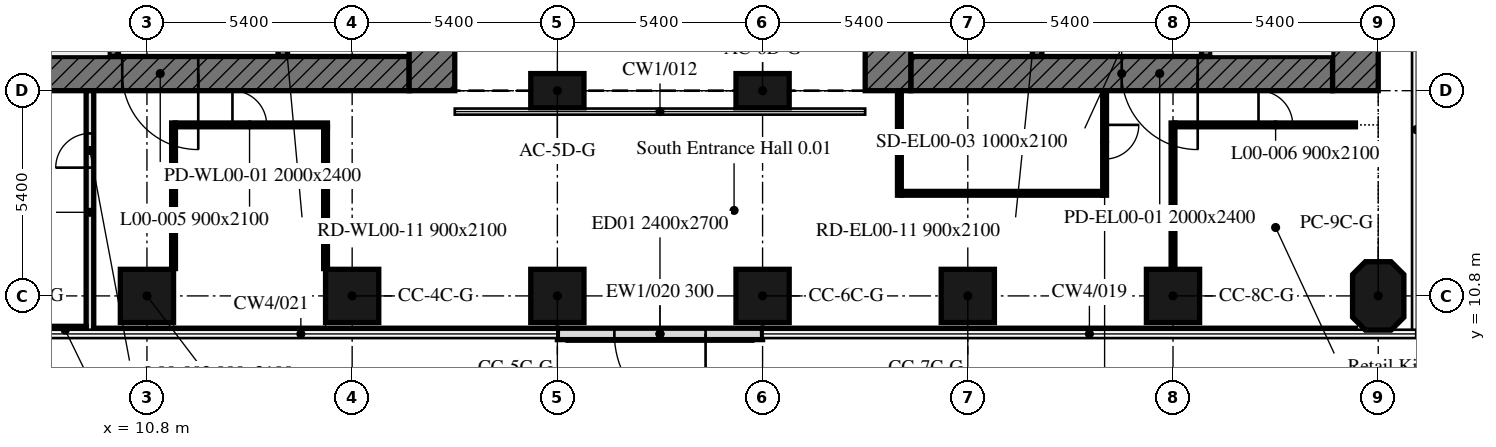
"""IFC4 building model, lengths in metres.
Left out: names, types, materials, properties, quantities, classifications, styles, units other than length and angle.
Written with IfcOpenShell. Run it as: python <this file> out.ifc"""

import sys

from ifc_helpers import new_model, si_unit, direction, frame, frame_2d, origin, origin_2d, place, context, subcontext, project, spatial, polyline, rectangle, outline, extrude, element, fill, save


model = new_model("IFC4")
c1 = context("Model", 3, precision=1e-05, world=origin(), true_north=direction((0.0, 1.0)))
c2 = subcontext(c1, "Body", "Model", "MODEL_VIEW")
j1 = project(units=[si_unit("LENGTHUNIT", "METRE"), si_unit("PLANEANGLEUNIT", "RADIAN")], contexts=[c1])
p1 = place(None, origin())
s1 = spatial("IfcSite", under=j1, at=p1, CompositionType="ELEMENT")
p2 = place(p1, origin())
s2 = spatial("IfcBuilding", under=s1, at=p2, CompositionType="ELEMENT")
p3 = place(p2, origin())
s3 = spatial("IfcBuildingStorey", under=s2, at=p3, CompositionType="ELEMENT", Elevation=0.0)
for number, where, z_axis, x_axis in (
    (1, (10.8, 10.8, 0.0), (0.0, 0.0, 1.0), (1.0, 0.0, 0.0)),
    (2, (16.2, 10.8, 0.0), (0.0, 0.0, 1.0), (1.0, 0.0, 0.0)),
    (3, (21.6, 10.8, 0.0), (0.0, 0.0, 1.0), (1.0, 0.0, 0.0)),
    (4, (27.0, 10.8, 0.0), (0.0, 0.0, 1.0), (1.0, 0.0, 0.0)),
    (5, (32.4, 10.8, 0.0), (0.0, 0.0, 1.0), (1.0, 0.0, 0.0)),
    (6, (37.8, 10.8, 0.0), (0.0, 0.0, 1.0), (1.0, 0.0, 0.0)),
):
    element("IfcColumn", number, at=place(p3, frame(where, z_axis=z_axis, x_axis=x_axis)), inside=s3, PredefinedType="COLUMN", context=c2, shape_type="SweptSolid", body=[
        extrude(rectangle(XDim=1.4, YDim=1.4, at=origin_2d()), origin(), (0.0, 0.0, 1.0), 8.0),
    ])
p4 = place(p3, frame((43.2, 10.8, 0.0), z_axis=(0.0, 0.0, 1.0), x_axis=(0.0, 1.0, 0.0)))
e7 = element("IfcColumn", 7, at=p4, inside=s3, PredefinedType="COLUMN", context=c2, shape_type="SweptSolid", body=[
    extrude(outline(polyline([(-0.562, -0.675), (0.562, -0.675), (0.9, -0.337), (0.9, 0.337), (0.562, 0.675), (-0.562, 0.675), (-0.9, 0.337), (-0.9, -0.337), (-0.562, -0.675)])), origin(), (0.0, 0.0, 1.0), 8.0),
])
for number, where, z_axis, x_axis in (
    (8, (21.6, 16.2, 0.0), (0.0, 0.0, 1.0), (1.0, 0.0, 0.0)),
    (9, (27.0, 16.2, 0.0), (0.0, 0.0, 1.0), (1.0, 0.0, 0.0)),
):
    element("IfcColumn", number, at=place(p3, frame(where, z_axis=z_axis, x_axis=x_axis)), inside=s3, PredefinedType="COLUMN", context=c2, shape_type="SweptSolid", body=[
        extrude(rectangle(XDim=1.4, YDim=0.9, at=origin_2d()), origin(), (0.0, 0.0, 1.0), 8.0),
    ])
p5 = place(p3, frame((27.0, 9.8, 0.0), z_axis=(0.0, 0.0, 1.0), x_axis=(-1.0, 0.0, 0.0)))
e10 = element("IfcWall", 10, at=p5, inside=s3, PredefinedType="SOLIDWALL", context=c2, shape_type="SweptSolid", body=[
    extrude(rectangle(XDim=5.4, YDim=0.3, at=frame_2d((2.7, 0.0))), origin(), (0.0, 0.0, 1.0), 8.0),
])
p6 = place(p5, frame((1.5, 0.0, 0.0)))
e11 = element("IfcOpeningElement", 11, at=p6, cuts=e10, PredefinedType="OPENING", context=c2, shape_type="SweptSolid", body=[
    extrude(rectangle(XDim=2.4, YDim=2.7, at=frame_2d((1.2, 1.35))), frame((0.0, 0.16, 0.0), z_axis=(0.0, -1.0, 0.0), x_axis=(1.0, 0.0, 0.0)), (0.0, 0.0, 1.0), 0.32),
])
p7 = place(p3, frame((17.7, 16.65, 0.0), z_axis=(0.0, 0.0, 1.0), x_axis=(-1.0, 0.0, 0.0)))
e12 = element("IfcWall", 12, at=p7, inside=s3, PredefinedType="SOLIDWALL", context=c2, shape_type="SweptSolid", body=[
    extrude(rectangle(XDim=11.1, YDim=0.9, at=frame_2d((5.55, 0.0))), origin(), (0.0, 0.0, 1.0), 8.0),
])
p8 = place(p7, frame((5.55, 0.0, 0.0)))
e13 = element("IfcOpeningElement", 13, at=p8, cuts=e12, PredefinedType="OPENING", context=c2, shape_type="SweptSolid", body=[
    extrude(rectangle(XDim=2.0, YDim=2.4, at=frame_2d((1.0, 1.2))), frame((0.0, 0.45, 0.0), z_axis=(0.0, -1.0, 0.0), x_axis=(1.0, 0.0, 0.0)), (0.0, 0.0, 1.0), 0.9),
])
p9 = place(p3, frame((18.3, 32.4, 0.0), z_axis=(0.0, 0.0, 1.0), x_axis=(0.0, -1.0, 0.0)))
e14 = element("IfcWall", 14, at=p9, inside=s3, PredefinedType="SOLIDWALL", context=c2, shape_type="SweptSolid", body=[
    extrude(rectangle(XDim=16.2, YDim=1.2, at=frame_2d((8.1, 0.0))), origin(), (0.0, 0.0, 1.0), 8.0),
])
p10 = place(p3, frame((9.925, 17.1, 0.0), z_axis=(0.0, 0.0, 1.0), x_axis=(0.0, 1.0, 0.0)))
e15 = element("IfcWall", 15, at=p10, inside=s3, PredefinedType="SOLIDWALL", context=c2, shape_type="SweptSolid", body=[
    extrude(rectangle(XDim=14.4, YDim=0.25, at=frame_2d((7.2, 0.0))), origin(), (0.0, 0.0, 1.0), 8.0),
])
p11 = place(p10, frame((4.6, 0.0, 0.0)))
e16 = element("IfcOpeningElement", 16, at=p11, cuts=e15, PredefinedType="OPENING", context=c2, shape_type="SweptSolid", body=[
    extrude(rectangle(XDim=1.0, YDim=2.1, at=frame_2d((0.5, 1.05))), frame((0.0, 0.125, 0.0), z_axis=(0.0, -1.0, 0.0), x_axis=(1.0, 0.0, 0.0)), (0.0, 0.0, 1.0), 0.25),
])
p12 = place(p10, frame((7.062, 0.0, 0.0)))
e17 = element("IfcOpeningElement", 17, at=p12, cuts=e15, PredefinedType="OPENING", context=c2, shape_type="SweptSolid", body=[
    extrude(rectangle(XDim=1.2, YDim=2.1, at=frame_2d((0.6, 1.05))), frame((0.0, 0.125, 0.0), z_axis=(0.0, -1.0, 0.0), x_axis=(1.0, 0.0, 0.0)), (0.0, 0.0, 1.0), 0.25),
])
p13 = place(p10, frame((9.925, 0.0, 0.0)))
e18 = element("IfcOpeningElement", 18, at=p13, cuts=e15, PredefinedType="OPENING", context=c2, shape_type="SweptSolid", body=[
    extrude(rectangle(XDim=1.1, YDim=2.1, at=frame_2d((0.55, 1.05))), frame((0.0, 0.125, 0.0), z_axis=(0.0, -1.0, 0.0), x_axis=(1.0, 0.0, 0.0)), (0.0, 0.0, 1.0), 0.25),
])
p14 = place(p10, frame((12.587, 0.0, 0.0)))
e19 = element("IfcOpeningElement", 19, at=p14, cuts=e15, PredefinedType="OPENING", context=c2, shape_type="SweptSolid", body=[
    extrude(rectangle(XDim=1.1, YDim=2.1, at=frame_2d((0.55, 1.05))), frame((0.0, 0.125, 0.0), z_axis=(0.0, -1.0, 0.0), x_axis=(1.0, 0.0, 0.0)), (0.0, 0.0, 1.0), 0.25),
])
p15 = place(p3, frame((14.375, 17.1, 0.0), z_axis=(0.0, 0.0, 1.0), x_axis=(0.0, 1.0, 0.0)))
e20 = element("IfcWall", 20, at=p15, inside=s3, PredefinedType="SOLIDWALL", context=c2, shape_type="SweptSolid", body=[
    extrude(rectangle(XDim=14.4, YDim=0.25, at=frame_2d((7.2, 0.0))), origin(), (0.0, 0.0, 1.0), 8.0),
])
p16 = place(p15, frame((13.15, 0.0, 0.0)))
e21 = element("IfcOpeningElement", 21, at=p16, cuts=e20, PredefinedType="OPENING", context=c2, shape_type="SweptSolid", body=[
    extrude(rectangle(XDim=1.0, YDim=2.1, at=frame_2d((0.5, 1.05))), frame((0.0, 0.125, 0.0), z_axis=(0.0, -1.0, 0.0), x_axis=(1.0, 0.0, 0.0)), (0.0, 0.0, 1.0), 0.25),
])
p17 = place(p15, frame((6.025, 0.0, 0.0)))
e22 = element("IfcOpeningElement", 22, at=p17, cuts=e20, PredefinedType="OPENING", context=c2, shape_type="SweptSolid", body=[
    extrude(rectangle(XDim=1.2, YDim=2.1, at=frame_2d((0.6, 1.05))), frame((0.0, 0.125, 0.0), z_axis=(0.0, -1.0, 0.0), x_axis=(1.0, 0.0, 0.0)), (0.0, 0.0, 1.0), 0.25),
])
p18 = place(p15, frame((0.846, 0.0, 0.0)))
e23 = element("IfcOpeningElement", 23, at=p18, cuts=e20, PredefinedType="OPENING", context=c2, shape_type="SweptSolid", body=[
    extrude(rectangle(XDim=0.9, YDim=2.1, at=frame_2d((0.45, 1.05))), frame((0.0, 0.125, 0.0), z_axis=(0.0, -1.0, 0.0), x_axis=(1.0, 0.0, 0.0)), (0.0, 0.0, 1.0), 0.25),
])
p19 = place(p15, frame((3.346, 0.0, 0.0)))
e24 = element("IfcOpeningElement", 24, at=p19, cuts=e20, PredefinedType="OPENING", context=c2, shape_type="SweptSolid", body=[
    extrude(rectangle(XDim=0.9, YDim=2.1, at=frame_2d((0.45, 1.05))), frame((0.0, 0.125, 0.0), z_axis=(0.0, -1.0, 0.0), x_axis=(1.0, 0.0, 0.0)), (0.0, 0.0, 1.0), 0.25),
])
p20 = place(p3, frame((42.0, 16.65, 0.0), z_axis=(0.0, 0.0, 1.0), x_axis=(-1.0, 0.0, 0.0)))
e25 = element("IfcWall", 25, at=p20, inside=s3, PredefinedType="SOLIDWALL", context=c2, shape_type="SweptSolid", body=[
    extrude(rectangle(XDim=11.1, YDim=0.9, at=frame_2d((5.55, 0.0))), origin(), (0.0, 0.0, 1.0), 8.0),
])
p21 = place(p20, frame((3.55, 0.0, 0.0)))
e26 = element("IfcOpeningElement", 26, at=p21, cuts=e25, PredefinedType="OPENING", context=c2, shape_type="SweptSolid", body=[
    extrude(rectangle(XDim=2.0, YDim=2.4, at=frame_2d((1.0, 1.2))), frame((0.0, 0.45, 0.0), z_axis=(0.0, -1.0, 0.0), x_axis=(1.0, 0.0, 0.0)), (0.0, 0.0, 1.0), 0.9),
])
p22 = place(p3, frame((42.6, 32.4, 0.0), z_axis=(0.0, 0.0, 1.0), x_axis=(0.0, -1.0, 0.0)))
e27 = element("IfcWall", 27, at=p22, inside=s3, PredefinedType="SOLIDWALL", context=c2, shape_type="SweptSolid", body=[
    extrude(rectangle(XDim=16.2, YDim=1.2, at=frame_2d((8.1, 0.0))), origin(), (0.0, 0.0, 1.0), 8.0),
])
p23 = place(p22, frame((9.45, 0.0, 0.0)))
e28 = element("IfcOpeningElement", 28, at=p23, cuts=e27, PredefinedType="OPENING", context=c2, shape_type="SweptSolid", body=[
    extrude(rectangle(XDim=1.2, YDim=2.1, at=frame_2d((0.6, 1.05))), frame((0.0, 0.6, 0.0), z_axis=(0.0, -1.0, 0.0), x_axis=(1.0, 0.0, 0.0)), (0.0, 0.0, 1.0), 1.2),
])
p24 = place(p3, frame((30.3, 16.2, 0.0), z_axis=(0.0, 0.0, 1.0), x_axis=(0.0, 1.0, 0.0)))
e29 = element("IfcWall", 29, at=p24, inside=s3, PredefinedType="SOLIDWALL", context=c2, shape_type="SweptSolid", body=[
    extrude(rectangle(XDim=16.2, YDim=1.2, at=frame_2d((8.1, 0.0))), origin(), (0.0, 0.0, 1.0), 8.0),
])
p25 = place(p3, frame((38.675, 17.1, 0.0), z_axis=(0.0, 0.0, 1.0), x_axis=(0.0, 1.0, 0.0)))
e30 = element("IfcWall", 30, at=p25, inside=s3, PredefinedType="SOLIDWALL", context=c2, shape_type="SweptSolid", body=[
    extrude(rectangle(XDim=14.4, YDim=0.25, at=frame_2d((7.2, 0.0))), origin(), (0.0, 0.0, 1.0), 8.0),
])
p26 = place(p25, frame((4.6, 0.0, 0.0)))
e31 = element("IfcOpeningElement", 31, at=p26, cuts=e30, PredefinedType="OPENING", context=c2, shape_type="SweptSolid", body=[
    extrude(rectangle(XDim=1.0, YDim=2.1, at=frame_2d((0.5, 1.05))), frame((0.0, 0.125, 0.0), z_axis=(0.0, -1.0, 0.0), x_axis=(1.0, 0.0, 0.0)), (0.0, 0.0, 1.0), 0.25),
])
p27 = place(p25, frame((7.062, 0.0, 0.0)))
e32 = element("IfcOpeningElement", 32, at=p27, cuts=e30, PredefinedType="OPENING", context=c2, shape_type="SweptSolid", body=[
    extrude(rectangle(XDim=1.2, YDim=2.1, at=frame_2d((0.6, 1.05))), frame((0.0, 0.125, 0.0), z_axis=(0.0, -1.0, 0.0), x_axis=(1.0, 0.0, 0.0)), (0.0, 0.0, 1.0), 0.25),
])
p28 = place(p25, frame((9.925, 0.0, 0.0)))
e33 = element("IfcOpeningElement", 33, at=p28, cuts=e30, PredefinedType="OPENING", context=c2, shape_type="SweptSolid", body=[
    extrude(rectangle(XDim=1.1, YDim=2.1, at=frame_2d((0.55, 1.05))), frame((0.0, 0.125, 0.0), z_axis=(0.0, -1.0, 0.0), x_axis=(1.0, 0.0, 0.0)), (0.0, 0.0, 1.0), 0.25),
])
p29 = place(p25, frame((12.587, 0.0, 0.0)))
e34 = element("IfcOpeningElement", 34, at=p29, cuts=e30, PredefinedType="OPENING", context=c2, shape_type="SweptSolid", body=[
    extrude(rectangle(XDim=1.1, YDim=2.1, at=frame_2d((0.55, 1.05))), frame((0.0, 0.125, 0.0), z_axis=(0.0, -1.0, 0.0), x_axis=(1.0, 0.0, 0.0)), (0.0, 0.0, 1.0), 0.25),
])
p30 = place(p3, frame((34.225, 17.1, 0.0), z_axis=(0.0, 0.0, 1.0), x_axis=(0.0, 1.0, 0.0)))
e35 = element("IfcWall", 35, at=p30, inside=s3, PredefinedType="SOLIDWALL", context=c2, shape_type="SweptSolid", body=[
    extrude(rectangle(XDim=14.4, YDim=0.25, at=frame_2d((7.2, 0.0))), origin(), (0.0, 0.0, 1.0), 8.0),
])
p31 = place(p30, frame((13.15, 0.0, 0.0)))
e36 = element("IfcOpeningElement", 36, at=p31, cuts=e35, PredefinedType="OPENING", context=c2, shape_type="SweptSolid", body=[
    extrude(rectangle(XDim=1.0, YDim=2.1, at=frame_2d((0.5, 1.05))), frame((0.0, 0.125, 0.0), z_axis=(0.0, -1.0, 0.0), x_axis=(1.0, 0.0, 0.0)), (0.0, 0.0, 1.0), 0.25),
])
p32 = place(p30, frame((6.025, 0.0, 0.0)))
e37 = element("IfcOpeningElement", 37, at=p32, cuts=e35, PredefinedType="OPENING", context=c2, shape_type="SweptSolid", body=[
    extrude(rectangle(XDim=1.2, YDim=2.1, at=frame_2d((0.6, 1.05))), frame((0.0, 0.125, 0.0), z_axis=(0.0, -1.0, 0.0), x_axis=(1.0, 0.0, 0.0)), (0.0, 0.0, 1.0), 0.25),
])
p33 = place(p30, frame((0.846, 0.0, 0.0)))
e38 = element("IfcOpeningElement", 38, at=p33, cuts=e35, PredefinedType="OPENING", context=c2, shape_type="SweptSolid", body=[
    extrude(rectangle(XDim=0.9, YDim=2.1, at=frame_2d((0.45, 1.05))), frame((0.0, 0.125, 0.0), z_axis=(0.0, -1.0, 0.0), x_axis=(1.0, 0.0, 0.0)), (0.0, 0.0, 1.0), 0.25),
])
p34 = place(p30, frame((3.346, 0.0, 0.0)))
e39 = element("IfcOpeningElement", 39, at=p34, cuts=e35, PredefinedType="OPENING", context=c2, shape_type="SweptSolid", body=[
    extrude(rectangle(XDim=0.9, YDim=2.1, at=frame_2d((0.45, 1.05))), frame((0.0, 0.125, 0.0), z_axis=(0.0, -1.0, 0.0), x_axis=(1.0, 0.0, 0.0)), (0.0, 0.0, 1.0), 0.25),
])
p35 = place(p3, frame((9.3, 9.8, 0.0), z_axis=(0.0, 0.0, 1.0), x_axis=(0.0, 1.0, 0.0)))
e40 = element("IfcWall", 40, at=p35, inside=s3, PredefinedType="PARTITIONING", context=c2, shape_type="SweptSolid", body=[
    extrude(rectangle(XDim=6.4, YDim=0.2, at=frame_2d((3.2, 0.0))), origin(), (0.0, 0.0, 1.0), 7.25),
])
p36 = place(p35, frame((4.375, 0.0, 0.0)))
e41 = element("IfcOpeningElement", 41, at=p36, cuts=e40, PredefinedType="OPENING", context=c2, shape_type="SweptSolid", body=[
    extrude(rectangle(XDim=0.9, YDim=2.1, at=frame_2d((0.45, 1.05))), frame((0.0, 0.1, 0.0), z_axis=(0.0, -1.0, 0.0), x_axis=(1.0, 0.0, 0.0)), (0.0, 0.0, 1.0), 0.2),
])
p37 = place(p3, frame((8.1, 9.9, 0.0), z_axis=(0.0, 0.0, 1.0), x_axis=(1.0, 0.0, 0.0)))
e42 = element("IfcWall", 42, at=p37, inside=s3, PredefinedType="PARTITIONING", context=c2, shape_type="SweptSolid", body=[
    extrude(rectangle(XDim=1.1, YDim=0.2, at=frame_2d((0.55, 0.0))), origin(), (0.0, 0.0, 1.0), 8.0),
])
p38 = place(p3, frame((30.6, 13.45, 0.0), z_axis=(0.0, 0.0, 1.0), x_axis=(0.0, 1.0, 0.0)))
e43 = element("IfcWall", 43, at=p38, inside=s3, PredefinedType="PARTITIONING", context=c2, shape_type="SweptSolid", body=[
    extrude(rectangle(XDim=2.75, YDim=0.1, at=frame_2d((1.375, 0.0))), origin(), (0.0, 0.0, 1.0), 8.0),
])
p39 = place(p3, frame((11.5, 11.52, 0.0), z_axis=(0.0, 0.0, 1.0), x_axis=(0.0, 1.0, 0.0)))
e44 = element("IfcWall", 44, at=p39, inside=s3, PredefinedType="PARTITIONING", context=c2, shape_type="SweptSolid", body=[
    extrude(rectangle(XDim=3.83, YDim=0.1, at=frame_2d((1.915, 0.0))), origin(), (0.0, 0.0, 1.0), 8.0),
])
p40 = place(p3, frame((11.55, 15.3, 0.0), z_axis=(0.0, 0.0, 1.0), x_axis=(1.0, 0.0, 0.0)))
e45 = element("IfcWall", 45, at=p40, inside=s3, PredefinedType="PARTITIONING", context=c2, shape_type="SweptSolid", body=[
    extrude(rectangle(XDim=4.0, YDim=0.1, at=frame_2d((2.0, 0.0))), origin(), (0.0, 0.0, 1.0), 8.0),
])
p41 = place(p40, frame((1.5, 0.0, 0.0)))
e46 = element("IfcOpeningElement", 46, at=p41, cuts=e45, PredefinedType="OPENING", context=c2, shape_type="SweptSolid", body=[
    extrude(rectangle(XDim=0.9, YDim=2.1, at=frame_2d((0.45, 1.05))), frame((0.0, 0.05, 0.0), z_axis=(0.0, -1.0, 0.0), x_axis=(1.0, 0.0, 0.0)), (0.0, 0.0, 1.0), 0.1),
])
p42 = place(p3, frame((15.5, 15.25, 0.0), z_axis=(0.0, 0.0, 1.0), x_axis=(0.0, -1.0, 0.0)))
e47 = element("IfcWall", 47, at=p42, inside=s3, PredefinedType="PARTITIONING", context=c2, shape_type="SweptSolid", body=[
    extrude(rectangle(XDim=3.73, YDim=0.1, at=frame_2d((1.865, 0.0))), origin(), (0.0, 0.0, 1.0), 8.0),
])
p43 = place(p3, frame((37.8, 11.601, 0.0), z_axis=(0.0, 0.0, 1.0), x_axis=(0.0, 1.0, 0.0)))
e48 = element("IfcWall", 48, at=p43, inside=s3, PredefinedType="PARTITIONING", context=c2, shape_type="SweptSolid", body=[
    extrude(rectangle(XDim=3.75, YDim=0.1, at=frame_2d((1.875, 0.0))), origin(), (0.0, 0.0, 1.0), 8.0),
])
p44 = place(p3, frame((37.85, 15.3, 0.0), z_axis=(0.0, 0.0, 1.0), x_axis=(1.0, 0.0, 0.0)))
e49 = element("IfcWall", 49, at=p44, inside=s3, PredefinedType="PARTITIONING", context=c2, shape_type="SweptSolid", body=[
    extrude(rectangle(XDim=4.75, YDim=0.1, at=frame_2d((2.375, 0.0))), origin(), (0.0, 0.0, 1.0), 8.0),
])
p45 = place(p44, frame((2.2, 0.0, 0.0)))
e50 = element("IfcOpeningElement", 50, at=p45, cuts=e49, PredefinedType="OPENING", context=c2, shape_type="SweptSolid", body=[
    extrude(rectangle(XDim=0.9, YDim=2.1, at=frame_2d((0.45, 1.05))), frame((0.0, 0.05, 0.0), z_axis=(0.0, -1.0, 0.0), x_axis=(1.0, 0.0, 0.0)), (0.0, 0.0, 1.0), 0.1),
])
p46 = place(p3, frame((36.0, 16.2, 0.0), z_axis=(0.0, 0.0, 1.0), x_axis=(0.0, -1.0, 0.0)))
e51 = element("IfcWall", 51, at=p46, inside=s3, PredefinedType="PARTITIONING", context=c2, shape_type="SweptSolid", body=[
    extrude(rectangle(XDim=2.75, YDim=0.1, at=frame_2d((1.375, 0.0))), origin(), (0.0, 0.0, 1.0), 8.0),
])
p47 = place(p46, frame((0.9, 0.0, 0.0)))
e52 = element("IfcOpeningElement", 52, at=p47, cuts=e51, PredefinedType="OPENING", context=c2, shape_type="SweptSolid", body=[
    extrude(rectangle(XDim=0.9, YDim=2.1, at=frame_2d((0.45, 1.05))), frame((0.0, 0.05, 0.0), z_axis=(0.0, -1.0, 0.0), x_axis=(1.0, 0.0, 0.0)), (0.0, 0.0, 1.0), 0.1),
])
p48 = place(p3, frame((35.95, 13.5, 0.0), z_axis=(0.0, 0.0, 1.0), x_axis=(-1.0, 0.0, 0.0)))
e53 = element("IfcWall", 53, at=p48, inside=s3, PredefinedType="PARTITIONING", context=c2, shape_type="SweptSolid", body=[
    extrude(rectangle(XDim=5.3, YDim=0.1, at=frame_2d((2.65, 0.0))), origin(), (0.0, 0.0, 1.0), 7.25),
])
p49 = place(p3, frame((9.4, 9.9, 0.0), z_axis=(0.0, 0.0, 1.0), x_axis=(1.0, 0.0, 0.0)))
e54 = element("IfcWall", 54, at=p49, inside=s3, PredefinedType="PARTITIONING", context=c2, shape_type="SweptSolid", body=[
    extrude(rectangle(XDim=12.2, YDim=0.1, at=frame_2d((6.1, 0.0))), origin(), (0.0, 0.0, 1.0), 7.25),
])
p50 = place(p3, frame((27.0, 9.9, 0.0), z_axis=(0.0, 0.0, 1.0), x_axis=(1.0, 0.0, 0.0)))
e55 = element("IfcWall", 55, at=p50, inside=s3, PredefinedType="PARTITIONING", context=c2, shape_type="SweptSolid", body=[
    extrude(rectangle(XDim=15.6, YDim=0.1, at=frame_2d((7.8, 0.0))), origin(), (0.0, 0.0, 1.0), 7.25),
])
p51 = place(p6, origin())
e56 = element("IfcDoor", 56, at=p51, inside=s3, OperationType="DOUBLE_DOOR_DOUBLE_SWING", PredefinedType="DOOR", context=c2, shape_type="SweptSolid", body=[
    extrude(rectangle(XDim=2.4, YDim=2.7, at=frame_2d((1.2, 1.35))), frame((0.0, 0.025, 0.0), z_axis=(0.0, -1.0, 0.0), x_axis=(1.0, 0.0, 0.0)), (0.0, 0.0, 1.0), 0.05),
])
fill(e11, e56)
p52 = place(p8, origin())
e57 = element("IfcDoor", 57, at=p52, inside=s3, OperationType="DOUBLE_DOOR_SINGLE_SWING", PredefinedType="DOOR", context=c2, shape_type="SweptSolid", body=[
    extrude(rectangle(XDim=2.0, YDim=2.4, at=frame_2d((1.0, 1.2))), frame((0.0, 0.025, 0.0), z_axis=(0.0, -1.0, 0.0), x_axis=(1.0, 0.0, 0.0)), (0.0, 0.0, 1.0), 0.05),
])
fill(e13, e57)
p53 = place(p21, origin())
e58 = element("IfcDoor", 58, at=p53, inside=s3, OperationType="DOUBLE_DOOR_SINGLE_SWING", PredefinedType="DOOR", context=c2, shape_type="SweptSolid", body=[
    extrude(rectangle(XDim=2.0, YDim=2.4, at=frame_2d((1.0, 1.2))), frame((0.0, 0.025, 0.0), z_axis=(0.0, -1.0, 0.0), x_axis=(1.0, 0.0, 0.0)), (0.0, 0.0, 1.0), 0.05),
])
fill(e26, e58)
p54 = place(p36, origin())
e59 = element("IfcDoor", 59, at=p54, inside=s3, OperationType="SINGLE_SWING_RIGHT", PredefinedType="DOOR", context=c2, shape_type="SweptSolid", body=[
    extrude(rectangle(XDim=0.9, YDim=2.1, at=frame_2d((0.45, 1.05))), frame((0.0, 0.025, 0.0), z_axis=(0.0, -1.0, 0.0), x_axis=(1.0, 0.0, 0.0)), (0.0, 0.0, 1.0), 0.05),
])
fill(e41, e59)
p55 = place(p41, origin())
e60 = element("IfcDoor", 60, at=p55, inside=s3, OperationType="SINGLE_SWING_RIGHT", PredefinedType="DOOR", context=c2, shape_type="SweptSolid", body=[
    extrude(rectangle(XDim=0.9, YDim=2.1, at=frame_2d((0.45, 1.05))), frame((0.0, 0.025, 0.0), z_axis=(0.0, -1.0, 0.0), x_axis=(1.0, 0.0, 0.0)), (0.0, 0.0, 1.0), 0.05),
])
fill(e46, e60)
p56 = place(p45, origin())
e61 = element("IfcDoor", 61, at=p56, inside=s3, OperationType="SINGLE_SWING_RIGHT", PredefinedType="DOOR", context=c2, shape_type="SweptSolid", body=[
    extrude(rectangle(XDim=0.9, YDim=2.1, at=frame_2d((0.45, 1.05))), frame((0.0, 0.025, 0.0), z_axis=(0.0, -1.0, 0.0), x_axis=(1.0, 0.0, 0.0)), (0.0, 0.0, 1.0), 0.05),
])
fill(e50, e61)
p57 = place(p47, origin())
e62 = element("IfcDoor", 62, at=p57, inside=s3, OperationType="SINGLE_SWING_LEFT", PredefinedType="DOOR", context=c2, shape_type="SweptSolid", body=[
    extrude(rectangle(XDim=0.9, YDim=2.1, at=frame_2d((0.45, 1.05))), frame((0.0, 0.025, 0.0), z_axis=(0.0, -1.0, 0.0), x_axis=(1.0, 0.0, 0.0)), (0.0, 0.0, 1.0), 0.05),
])
fill(e52, e62)
save(model, sys.argv[1])
